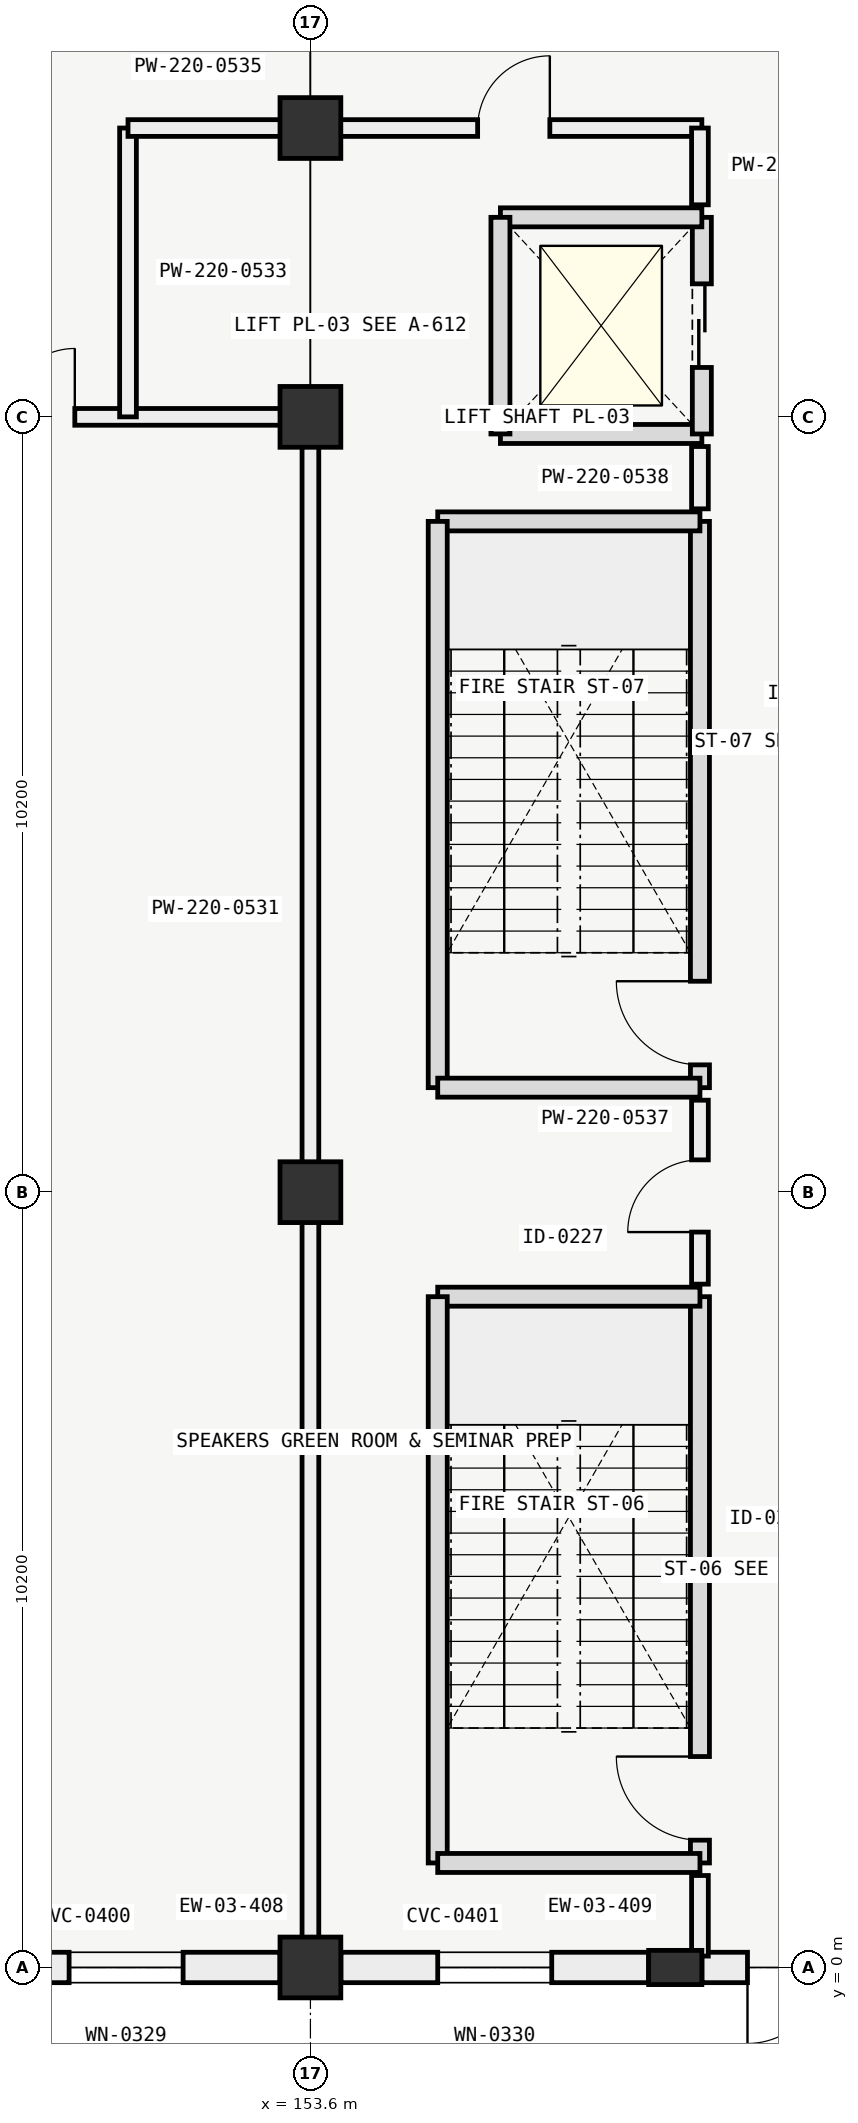
"""IFC4 building model, lengths in metres.
Left out: names, types, materials, properties, quantities, classifications, styles, units other than length and angle.
Written with IfcOpenShell. Run it as: python <this file> out.ifc"""

import sys

from ifc_helpers import new_model, si_unit, direction, frame, frame_2d, origin, origin_2d, place, context, subcontext, project, spatial, rectangle, extrude, element, fill, save


model = new_model("IFC4")
c1 = context("Model", 3, precision=1e-05, world=origin(), true_north=direction((0.0, 1.0)))
c2 = subcontext(c1, "Body", "Model", "MODEL_VIEW")
j1 = project(units=[si_unit("LENGTHUNIT", "METRE"), si_unit("PLANEANGLEUNIT", "RADIAN")], contexts=[c1])
p1 = place(None, origin())
s1 = spatial("IfcSite", under=j1, at=p1, CompositionType="ELEMENT")
p2 = place(p1, origin())
s2 = spatial("IfcBuilding", under=s1, at=p2, CompositionType="ELEMENT")
p3 = place(p2, origin())
s3 = spatial("IfcBuildingStorey", under=s2, at=p3, CompositionType="ELEMENT", Elevation=0.0)
for number, where, z_axis, x_axis in (
    (1, (153.6, 0.0, 0.0), (0.0, 0.0, 1.0), (1.0, 0.0, 0.0)),
    (2, (153.6, 10.2, 0.0), (0.0, 0.0, 1.0), (1.0, 0.0, 0.0)),
    (3, (153.6, 20.4, 0.0), (0.0, 0.0, 1.0), (1.0, 0.0, 0.0)),
    (4, (153.6, 24.2, 0.0), (0.0, 0.0, 1.0), (1.0, 0.0, 0.0)),
):
    element("IfcColumn", number, at=place(p3, frame(where, z_axis=z_axis, x_axis=x_axis)), inside=s3, PredefinedType="COLUMN", context=c2, shape_type="SweptSolid", body=[
        extrude(rectangle(XDim=0.8, YDim=0.8, at=origin_2d()), origin(), (0.0, 0.0, 1.0), 5.4),
    ])
p4 = place(p3, frame((158.4, 0.0, 0.0), z_axis=(0.0, 0.0, 1.0), x_axis=(0.0, 1.0, 0.0)))
e5 = element("IfcColumn", 5, at=p4, inside=s3, PredefinedType="PILASTER", context=c2, shape_type="SweptSolid", body=[
    extrude(rectangle(XDim=0.45, YDim=0.7, at=origin_2d()), origin(), (0.0, 0.0, 1.0), 5.4),
])
p5 = place(p3, frame((153.199, 0.0, 0.0), z_axis=(0.0, 0.0, 1.0), x_axis=(-1.0, 0.0, 0.0)))
e6 = element("IfcWall", 6, at=p5, inside=s3, PredefinedType="SOLIDWALL", context=c2, shape_type="SweptSolid", body=[
    extrude(rectangle(XDim=4.048, YDim=0.4, at=frame_2d((2.024, 0.0))), origin(), (0.0, 0.0, 1.0), 4.5),
])
p6 = place(p5, frame((1.274, 0.0, 0.85)))
e7 = element("IfcOpeningElement", 7, at=p6, cuts=e6, PredefinedType="OPENING", context=c2, shape_type="SweptSolid", body=[
    extrude(rectangle(XDim=1.5, YDim=2.6, at=frame_2d((0.75, 1.3))), frame((0.0, 0.21, 0.0), z_axis=(0.0, -1.0, 0.0), x_axis=(1.0, 0.0, 0.0)), (0.0, 0.0, 1.0), 0.42),
])
p7 = place(p3, frame((158.049, 0.0, 0.0), z_axis=(0.0, 0.0, 1.0), x_axis=(-1.0, 0.0, 0.0)))
e8 = element("IfcWall", 8, at=p7, inside=s3, PredefinedType="SOLIDWALL", context=c2, shape_type="SweptSolid", body=[
    extrude(rectangle(XDim=4.048, YDim=0.4, at=frame_2d((2.024, 0.0))), origin(), (0.0, 0.0, 1.0), 4.45),
])
p8 = place(p7, frame((1.274, 0.0, 0.85)))
e9 = element("IfcOpeningElement", 9, at=p8, cuts=e8, PredefinedType="OPENING", context=c2, shape_type="SweptSolid", body=[
    extrude(rectangle(XDim=1.5, YDim=2.6, at=frame_2d((0.75, 1.3))), frame((0.0, 0.21, 0.0), z_axis=(0.0, -1.0, 0.0), x_axis=(1.0, 0.0, 0.0)), (0.0, 0.0, 1.0), 0.42),
])
p9 = place(p3, frame((161.95, 0.0, 0.0), z_axis=(0.0, 0.0, 1.0), x_axis=(-1.0, 0.0, 0.0)))
e10 = element("IfcWall", 10, at=p9, inside=s3, PredefinedType="SOLIDWALL", context=c2, shape_type="SweptSolid", body=[
    extrude(rectangle(XDim=3.199, YDim=0.4, at=frame_2d((1.6, 0.0))), origin(), (0.0, 0.0, 1.0), 4.45),
])
p10 = place(p9, frame((0.6, 0.0, 0.0)))
e11 = element("IfcOpeningElement", 11, at=p10, cuts=e10, PredefinedType="OPENING", context=c2, shape_type="SweptSolid", body=[
    extrude(rectangle(XDim=2.0, YDim=2.4, at=frame_2d((1.0, 1.2))), frame((0.0, 0.21, 0.0), z_axis=(0.0, -1.0, 0.0), x_axis=(1.0, 0.0, 0.0)), (0.0, 0.0, 1.0), 0.42),
])
p11 = place(p3, frame((158.725, 1.375, 0.0), z_axis=(0.0, 0.0, 1.0), x_axis=(0.0, 1.0, 0.0)))
e12 = element("IfcWall", 12, at=p11, inside=s3, PredefinedType="SOLIDWALL", context=c2, shape_type="SweptSolid", body=[
    extrude(rectangle(XDim=7.45, YDim=0.25, at=frame_2d((3.725, 0.0))), origin(), (0.0, 0.0, 1.0), 5.12),
])
p12 = place(p11, frame((0.3, 0.0, 0.0)))
e13 = element("IfcOpeningElement", 13, at=p12, cuts=e12, PredefinedType="OPENING", context=c2, shape_type="SweptSolid", body=[
    extrude(rectangle(XDim=1.1, YDim=2.2, at=frame_2d((0.55, 1.1))), frame((0.0, 0.135, 0.0), z_axis=(0.0, -1.0, 0.0), x_axis=(1.0, 0.0, 0.0)), (0.0, 0.0, 1.0), 0.27),
])
p13 = place(p3, frame((158.725, 8.825, 0.0), z_axis=(0.0, 0.0, 1.0), x_axis=(-1.0, 0.0, 0.0)))
e14 = element("IfcWall", 14, at=p13, inside=s3, PredefinedType="SOLIDWALL", context=c2, shape_type="SweptSolid", body=[
    extrude(rectangle(XDim=3.45, YDim=0.25, at=frame_2d((1.725, 0.0))), origin(), (0.0, 0.0, 1.0), 5.12),
])
p14 = place(p3, frame((155.275, 8.825, 0.0), z_axis=(0.0, 0.0, 1.0), x_axis=(0.0, -1.0, 0.0)))
e15 = element("IfcWall", 15, at=p14, inside=s3, PredefinedType="SOLIDWALL", context=c2, shape_type="SweptSolid", body=[
    extrude(rectangle(XDim=7.45, YDim=0.25, at=frame_2d((3.725, 0.0))), origin(), (0.0, 0.0, 1.0), 5.12),
])
p15 = place(p3, frame((158.725, 1.375, 0.0), z_axis=(0.0, 0.0, 1.0), x_axis=(-1.0, 0.0, 0.0)))
e16 = element("IfcWall", 16, at=p15, inside=s3, PredefinedType="SOLIDWALL", context=c2, shape_type="SweptSolid", body=[
    extrude(rectangle(XDim=3.45, YDim=0.25, at=frame_2d((1.725, 0.0))), origin(), (0.0, 0.0, 1.0), 5.12),
])
p16 = place(p3, frame((158.725, 11.575, 0.0), z_axis=(0.0, 0.0, 1.0), x_axis=(0.0, 1.0, 0.0)))
e17 = element("IfcWall", 17, at=p16, inside=s3, PredefinedType="SOLIDWALL", context=c2, shape_type="SweptSolid", body=[
    extrude(rectangle(XDim=7.45, YDim=0.25, at=frame_2d((3.725, 0.0))), origin(), (0.0, 0.0, 1.0), 5.12),
])
p17 = place(p16, frame((0.3, 0.0, 0.0)))
e18 = element("IfcOpeningElement", 18, at=p17, cuts=e17, PredefinedType="OPENING", context=c2, shape_type="SweptSolid", body=[
    extrude(rectangle(XDim=1.1, YDim=2.2, at=frame_2d((0.55, 1.1))), frame((0.0, 0.135, 0.0), z_axis=(0.0, -1.0, 0.0), x_axis=(1.0, 0.0, 0.0)), (0.0, 0.0, 1.0), 0.27),
])
p18 = place(p3, frame((158.725, 19.025, 0.0), z_axis=(0.0, 0.0, 1.0), x_axis=(-1.0, 0.0, 0.0)))
e19 = element("IfcWall", 19, at=p18, inside=s3, PredefinedType="SOLIDWALL", context=c2, shape_type="SweptSolid", body=[
    extrude(rectangle(XDim=3.45, YDim=0.25, at=frame_2d((1.725, 0.0))), origin(), (0.0, 0.0, 1.0), 5.12),
])
p19 = place(p3, frame((155.275, 19.025, 0.0), z_axis=(0.0, 0.0, 1.0), x_axis=(0.0, -1.0, 0.0)))
e20 = element("IfcWall", 20, at=p19, inside=s3, PredefinedType="SOLIDWALL", context=c2, shape_type="SweptSolid", body=[
    extrude(rectangle(XDim=7.45, YDim=0.25, at=frame_2d((3.725, 0.0))), origin(), (0.0, 0.0, 1.0), 5.12),
])
p20 = place(p3, frame((158.725, 11.575, 0.0), z_axis=(0.0, 0.0, 1.0), x_axis=(-1.0, 0.0, 0.0)))
e21 = element("IfcWall", 21, at=p20, inside=s3, PredefinedType="SOLIDWALL", context=c2, shape_type="SweptSolid", body=[
    extrude(rectangle(XDim=3.45, YDim=0.25, at=frame_2d((1.725, 0.0))), origin(), (0.0, 0.0, 1.0), 5.12),
])
p21 = place(p3, frame((156.1, 20.175, 0.0), z_axis=(0.0, 0.0, 1.0), x_axis=(1.0, 0.0, 0.0)))
e22 = element("IfcWall", 22, at=p21, inside=s3, PredefinedType="SOLIDWALL", context=c2, shape_type="SweptSolid", body=[
    extrude(rectangle(XDim=2.65, YDim=0.25, at=frame_2d((1.325, 0.0))), origin(), (0.0, 0.0, 1.0), 5.12),
])
p22 = place(p3, frame((158.75, 20.175, 0.0), z_axis=(0.0, 0.0, 1.0), x_axis=(0.0, 1.0, 0.0)))
e23 = element("IfcWall", 23, at=p22, inside=s3, PredefinedType="SOLIDWALL", context=c2, shape_type="SweptSolid", body=[
    extrude(rectangle(XDim=2.85, YDim=0.25, at=frame_2d((1.425, 0.0))), origin(), (0.0, 0.0, 1.0), 5.12),
])
p23 = place(p22, frame((0.875, 0.0, 0.0)))
e24 = element("IfcOpeningElement", 24, at=p23, cuts=e23, PredefinedType="OPENING", context=c2, shape_type="SweptSolid", body=[
    extrude(rectangle(XDim=1.1, YDim=2.1, at=frame_2d((0.55, 1.05))), frame((0.0, 0.135, 0.0), z_axis=(0.0, -1.0, 0.0), x_axis=(1.0, 0.0, 0.0)), (0.0, 0.0, 1.0), 0.27),
])
p24 = place(p3, frame((158.75, 23.025, 0.0), z_axis=(0.0, 0.0, 1.0), x_axis=(-1.0, 0.0, 0.0)))
e25 = element("IfcWall", 25, at=p24, inside=s3, PredefinedType="SOLIDWALL", context=c2, shape_type="SweptSolid", body=[
    extrude(rectangle(XDim=2.65, YDim=0.25, at=frame_2d((1.325, 0.0))), origin(), (0.0, 0.0, 1.0), 5.12),
])
p25 = place(p3, frame((156.1, 23.025, 0.0), z_axis=(0.0, 0.0, 1.0), x_axis=(0.0, -1.0, 0.0)))
e26 = element("IfcWall", 26, at=p25, inside=s3, PredefinedType="SOLIDWALL", context=c2, shape_type="SweptSolid", body=[
    extrude(rectangle(XDim=2.85, YDim=0.25, at=frame_2d((1.425, 0.0))), origin(), (0.0, 0.0, 1.0), 5.12),
])
p26 = place(p3, frame((134.55, 20.4, 0.0), z_axis=(0.0, 0.0, 1.0), x_axis=(1.0, 0.0, 0.0)))
e27 = element("IfcWall", 27, at=p26, inside=s3, PredefinedType="PARTITIONING", context=c2, shape_type="SweptSolid", body=[
    extrude(rectangle(XDim=19.05, YDim=0.22, at=frame_2d((9.525, 0.0))), origin(), (0.0, 0.0, 1.0), 4.4),
])
p27 = place(p26, frame((14.15, 0.0, 0.0)))
e28 = element("IfcOpeningElement", 28, at=p27, cuts=e27, PredefinedType="OPENING", context=c2, shape_type="SweptSolid", body=[
    extrude(rectangle(XDim=1.8, YDim=2.2, at=frame_2d((0.9, 1.1))), frame((0.0, 0.12, 0.0), z_axis=(0.0, -1.0, 0.0), x_axis=(1.0, 0.0, 0.0)), (0.0, 0.0, 1.0), 0.24),
])
p28 = place(p3, frame((153.6, 0.15, 0.0), z_axis=(0.0, 0.0, 1.0), x_axis=(0.0, 1.0, 0.0)))
e29 = element("IfcWall", 29, at=p28, inside=s3, PredefinedType="PARTITIONING", context=c2, shape_type="SweptSolid", body=[
    extrude(rectangle(XDim=20.25, YDim=0.22, at=frame_2d((10.125, 0.0))), origin(), (0.0, 0.0, 1.0), 4.4),
])
p29 = place(p3, frame((151.2, 20.4, 0.0), z_axis=(0.0, 0.0, 1.0), x_axis=(0.0, 1.0, 0.0)))
e30 = element("IfcWall", 30, at=p29, inside=s3, PredefinedType="PARTITIONING", context=c2, shape_type="SweptSolid", body=[
    extrude(rectangle(XDim=3.8, YDim=0.22, at=frame_2d((1.9, 0.0))), origin(), (0.0, 0.0, 1.0), 4.4),
])
p30 = place(p3, frame((151.2, 24.2, 0.0), z_axis=(0.0, 0.0, 1.0), x_axis=(1.0, 0.0, 0.0)))
e31 = element("IfcWall", 31, at=p30, inside=s3, PredefinedType="PARTITIONING", context=c2, shape_type="SweptSolid", body=[
    extrude(rectangle(XDim=7.55, YDim=0.22, at=frame_2d((3.775, 0.0))), origin(), (0.0, 0.0, 1.0), 4.45),
])
p31 = place(p30, frame((4.6, 0.0, 0.0)))
e32 = element("IfcOpeningElement", 32, at=p31, cuts=e31, PredefinedType="OPENING", context=c2, shape_type="SweptSolid", body=[
    extrude(rectangle(XDim=0.95, YDim=2.1, at=frame_2d((0.475, 1.05))), frame((0.0, 0.12, 0.0), z_axis=(0.0, -1.0, 0.0), x_axis=(1.0, 0.0, 0.0)), (0.0, 0.0, 1.0), 0.24),
])
p32 = place(p3, frame((158.725, 0.15, 0.0), z_axis=(0.0, 0.0, 1.0), x_axis=(0.0, 1.0, 0.0)))
e33 = element("IfcWall", 33, at=p32, inside=s3, PredefinedType="PARTITIONING", context=c2, shape_type="SweptSolid", body=[
    extrude(rectangle(XDim=1.06, YDim=0.22, at=frame_2d((0.53, 0.0))), origin(), (0.0, 0.0, 1.0), 4.45),
])
p33 = place(p3, frame((158.725, 8.99, 0.0), z_axis=(0.0, 0.0, 1.0), x_axis=(0.0, 1.0, 0.0)))
e34 = element("IfcWall", 34, at=p33, inside=s3, PredefinedType="PARTITIONING", context=c2, shape_type="SweptSolid", body=[
    extrude(rectangle(XDim=2.42, YDim=0.22, at=frame_2d((1.21, 0.0))), origin(), (0.0, 0.0, 1.0), 4.4),
])
p34 = place(p33, frame((0.685, 0.0, 0.0)))
e35 = element("IfcOpeningElement", 35, at=p34, cuts=e34, PredefinedType="OPENING", context=c2, shape_type="SweptSolid", body=[
    extrude(rectangle(XDim=0.95, YDim=2.1, at=frame_2d((0.475, 1.05))), frame((0.0, 0.12, 0.0), z_axis=(0.0, -1.0, 0.0), x_axis=(1.0, 0.0, 0.0)), (0.0, 0.0, 1.0), 0.24),
])
p35 = place(p3, frame((158.725, 19.19, 0.0), z_axis=(0.0, 0.0, 1.0), x_axis=(0.0, 1.0, 0.0)))
e36 = element("IfcWall", 36, at=p35, inside=s3, PredefinedType="PARTITIONING", context=c2, shape_type="SweptSolid", body=[
    extrude(rectangle(XDim=0.82, YDim=0.22, at=frame_2d((0.41, 0.0))), origin(), (0.0, 0.0, 1.0), 5.05),
])
p36 = place(p3, frame((158.725, 23.19, 0.0), z_axis=(0.0, 0.0, 1.0), x_axis=(0.0, 1.0, 0.0)))
e37 = element("IfcWall", 37, at=p36, inside=s3, PredefinedType="PARTITIONING", context=c2, shape_type="SweptSolid", body=[
    extrude(rectangle(XDim=1.01, YDim=0.22, at=frame_2d((0.505, 0.0))), origin(), (0.0, 0.0, 1.0), 5.05),
])
p37 = place(p6, origin())
e38 = element("IfcWindow", 38, at=p37, inside=s3, PartitioningType="SINGLE_PANEL", PredefinedType="WINDOW", context=c2, shape_type="SweptSolid", body=[
    extrude(rectangle(XDim=1.5, YDim=2.6, at=frame_2d((0.75, 1.3))), frame((0.0, 0.03, 0.0), z_axis=(0.0, -1.0, 0.0), x_axis=(1.0, 0.0, 0.0)), (0.0, 0.0, 1.0), 0.06),
])
fill(e7, e38)
p38 = place(p8, origin())
e39 = element("IfcWindow", 39, at=p38, inside=s3, PartitioningType="SINGLE_PANEL", PredefinedType="WINDOW", context=c2, shape_type="SweptSolid", body=[
    extrude(rectangle(XDim=1.5, YDim=2.6, at=frame_2d((0.75, 1.3))), frame((0.0, 0.03, 0.0), z_axis=(0.0, -1.0, 0.0), x_axis=(1.0, 0.0, 0.0)), (0.0, 0.0, 1.0), 0.06),
])
fill(e9, e39)
p39 = place(p10, origin())
e40 = element("IfcDoor", 40, at=p39, inside=s3, OperationType="DOUBLE_DOOR_SINGLE_SWING", PredefinedType="DOOR", context=c2, shape_type="SweptSolid", body=[
    extrude(rectangle(XDim=2.0, YDim=2.4, at=frame_2d((1.0, 1.2))), frame((0.0, 0.025, 0.0), z_axis=(0.0, -1.0, 0.0), x_axis=(1.0, 0.0, 0.0)), (0.0, 0.0, 1.0), 0.05),
])
fill(e11, e40)
p40 = place(p12, origin())
e41 = element("IfcDoor", 41, at=p40, inside=s3, OperationType="SINGLE_SWING_RIGHT", PredefinedType="DOOR", context=c2, shape_type="SweptSolid", body=[
    extrude(rectangle(XDim=1.1, YDim=2.2, at=frame_2d((0.55, 1.1))), frame((0.0, 0.025, 0.0), z_axis=(0.0, -1.0, 0.0), x_axis=(1.0, 0.0, 0.0)), (0.0, 0.0, 1.0), 0.05),
])
fill(e13, e41)
p41 = place(p17, origin())
e42 = element("IfcDoor", 42, at=p41, inside=s3, OperationType="SINGLE_SWING_RIGHT", PredefinedType="DOOR", context=c2, shape_type="SweptSolid", body=[
    extrude(rectangle(XDim=1.1, YDim=2.2, at=frame_2d((0.55, 1.1))), frame((0.0, 0.025, 0.0), z_axis=(0.0, -1.0, 0.0), x_axis=(1.0, 0.0, 0.0)), (0.0, 0.0, 1.0), 0.05),
])
fill(e18, e42)
p42 = place(p23, origin())
e43 = element("IfcDoor", 43, at=p42, inside=s3, OperationType="SLIDING_TO_LEFT", PredefinedType="DOOR", context=c2, shape_type="SweptSolid", body=[
    extrude(rectangle(XDim=1.1, YDim=2.1, at=frame_2d((0.55, 1.05))), frame((0.0, 0.025, 0.0), z_axis=(0.0, -1.0, 0.0), x_axis=(1.0, 0.0, 0.0)), (0.0, 0.0, 1.0), 0.05),
])
fill(e24, e43)
p43 = place(p27, origin())
e44 = element("IfcDoor", 44, at=p43, inside=s3, OperationType="DOUBLE_DOOR_SINGLE_SWING", PredefinedType="DOOR", context=c2, shape_type="SweptSolid", body=[
    extrude(rectangle(XDim=1.8, YDim=2.2, at=frame_2d((0.9, 1.1))), frame((0.0, 0.025, 0.0), z_axis=(0.0, -1.0, 0.0), x_axis=(1.0, 0.0, 0.0)), (0.0, 0.0, 1.0), 0.05),
])
fill(e28, e44)
p44 = place(p31, origin())
e45 = element("IfcDoor", 45, at=p44, inside=s3, OperationType="SINGLE_SWING_RIGHT", PredefinedType="DOOR", context=c2, shape_type="SweptSolid", body=[
    extrude(rectangle(XDim=0.95, YDim=2.1, at=frame_2d((0.475, 1.05))), frame((0.0, 0.025, 0.0), z_axis=(0.0, -1.0, 0.0), x_axis=(1.0, 0.0, 0.0)), (0.0, 0.0, 1.0), 0.05),
])
fill(e32, e45)
p45 = place(p34, origin())
e46 = element("IfcDoor", 46, at=p45, inside=s3, OperationType="SINGLE_SWING_LEFT", PredefinedType="DOOR", context=c2, shape_type="SweptSolid", body=[
    extrude(rectangle(XDim=0.95, YDim=2.1, at=frame_2d((0.475, 1.05))), frame((0.0, 0.025, 0.0), z_axis=(0.0, -1.0, 0.0), x_axis=(1.0, 0.0, 0.0)), (0.0, 0.0, 1.0), 0.05),
])
fill(e35, e46)
save(model, sys.argv[1])
